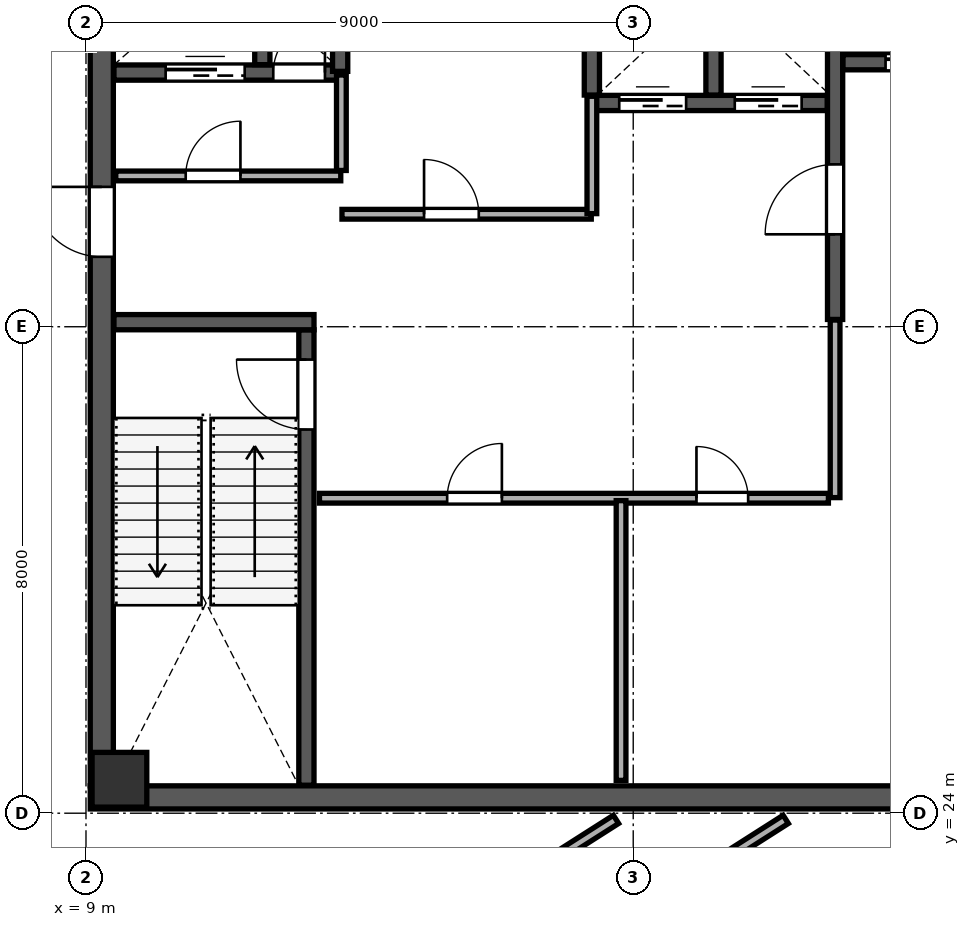
"""IFC4 building model, lengths in metres.
Left out: names, types, materials, properties, quantities, classifications, styles, units other than length and angle.
Written with IfcOpenShell. Run it as: python <this file> out.ifc"""

import sys

from ifc_helpers import new_model, si_unit, direction, frame, frame_2d, origin, origin_2d, place, context, subcontext, project, spatial, rectangle, extrude, source, transform, mapped, element, fill, save


model = new_model("IFC4")
c1 = context("Model", 3, precision=1e-05, world=origin(), true_north=direction((0.0, 1.0)))
c2 = subcontext(c1, "Body", "Model", "MODEL_VIEW")
j1 = project(units=[si_unit("LENGTHUNIT", "METRE"), si_unit("PLANEANGLEUNIT", "RADIAN")], contexts=[c1])
p1 = place(None, origin())
s1 = spatial("IfcSite", under=j1, at=p1, CompositionType="ELEMENT")
p2 = place(p1, origin())
s2 = spatial("IfcBuilding", under=s1, at=p2, CompositionType="ELEMENT")
p3 = place(p2, frame((0.0, 0.0, 315.6)))
s3 = spatial("IfcBuildingStorey", under=s2, at=p3, CompositionType="ELEMENT", Elevation=315.6)
m1 = source(origin(), c2, "Body", "SweptSolid", [
    extrude(rectangle(XDim=0.9, YDim=0.9, at=origin_2d()), origin(), (0.0, 0.0, 1.0), 4.198),
])
p4 = place(p3, frame((9.55, 24.55, 0.001), z_axis=(0.0, 0.0, 1.0), x_axis=(1.0, 0.0, 0.0)))
e1 = element("IfcColumn", 1, at=p4, inside=s3, PredefinedType="COLUMN", context=c2, shape_type="MappedRepresentation", body=[
    mapped(m1, transform((0.0, 0.0, 0.0), scale=1.0)),
])
p5 = place(p3, frame((9.26, 24.45, 0.0), z_axis=(0.0, 0.0, 1.0), x_axis=(0.0, 1.0, 0.0)))
e2 = element("IfcWall", 2, at=p5, inside=s3, PredefinedType="SHEAR", context=c2, shape_type="SweptSolid", body=[
    extrude(rectangle(XDim=15.1, YDim=0.38, at=frame_2d((7.55, 0.0))), origin(), (0.0, 0.0, 1.0), 3.96),
])
p6 = place(p5, frame((8.7, 0.0, 0.0)))
e3 = element("IfcOpeningElement", 3, at=p6, cuts=e2, PredefinedType="OPENING", context=c2, shape_type="SweptSolid", body=[
    extrude(rectangle(XDim=1.15, YDim=2.2, at=frame_2d((0.575, 1.1))), frame((0.0, 0.2, 0.0), z_axis=(0.0, -1.0, 0.0), x_axis=(1.0, 0.0, 0.0)), (0.0, 0.0, 1.0), 0.4),
])
p7 = place(p3, frame((9.07, 24.26, 0.0), z_axis=(0.0, 0.0, 1.0), x_axis=(1.0, 0.0, 0.0)))
e4 = element("IfcWall", 4, at=p7, inside=s3, PredefinedType="SHEAR", context=c2, shape_type="SweptSolid", body=[
    extrude(rectangle(XDim=17.86, YDim=0.38, at=frame_2d((8.93, 0.0))), origin(), (0.0, 0.0, 1.0), 3.96),
])
p8 = place(p3, frame((12.625, 24.46, 0.0), z_axis=(0.0, 0.0, 1.0), x_axis=(0.0, 1.0, 0.0)))
e5 = element("IfcWall", 5, at=p8, inside=s3, PredefinedType="SHEAR", context=c2, shape_type="SweptSolid", body=[
    extrude(rectangle(XDim=7.49, YDim=0.25, at=frame_2d((3.745, 0.0))), origin(), (0.0, 0.0, 1.0), 3.96),
])
p9 = place(p8, frame((5.85, 0.0, 0.0)))
e6 = element("IfcOpeningElement", 6, at=p9, cuts=e5, PredefinedType="OPENING", context=c2, shape_type="SweptSolid", body=[
    extrude(rectangle(XDim=1.15, YDim=2.2, at=frame_2d((0.575, 1.1))), frame((0.0, 0.135, 0.0), z_axis=(0.0, -1.0, 0.0), x_axis=(1.0, 0.0, 0.0)), (0.0, 0.0, 1.0), 0.27),
])
p10 = place(p3, frame((9.46, 32.075, 0.0), z_axis=(0.0, 0.0, 1.0), x_axis=(1.0, 0.0, 0.0)))
e7 = element("IfcWall", 7, at=p10, inside=s3, PredefinedType="SHEAR", context=c2, shape_type="SweptSolid", body=[
    extrude(rectangle(XDim=3.29, YDim=0.25, at=frame_2d((1.645, 0.0))), origin(), (0.0, 0.0, 1.0), 3.96),
])
p11 = place(p3, frame((21.32, 32.12, 0.0), z_axis=(0.0, 0.0, 1.0), x_axis=(0.0, 1.0, 0.0)))
e8 = element("IfcWall", 8, at=p11, inside=s3, PredefinedType="SHEAR", context=c2, shape_type="SweptSolid", body=[
    extrude(rectangle(XDim=7.42, YDim=0.25, at=frame_2d((3.71, 0.0))), origin(), (0.0, 0.0, 1.0), 3.96),
])
p12 = place(p11, frame((1.4, 0.0, 0.0)))
e9 = element("IfcOpeningElement", 9, at=p12, cuts=e8, PredefinedType="OPENING", context=c2, shape_type="SweptSolid", body=[
    extrude(rectangle(XDim=1.15, YDim=2.2, at=frame_2d((0.575, 1.1))), frame((0.0, 0.135, 0.0), z_axis=(0.0, -1.0, 0.0), x_axis=(1.0, 0.0, 0.0)), (0.0, 0.0, 1.0), 0.27),
])
p13 = place(p3, frame((9.46, 36.18, 0.0), z_axis=(0.0, 0.0, 1.0), x_axis=(1.0, 0.0, 0.0)))
e10 = element("IfcWall", 10, at=p13, inside=s3, PredefinedType="SHEAR", context=c2, shape_type="SweptSolid", body=[
    extrude(rectangle(XDim=3.79, YDim=0.25, at=frame_2d((1.895, 0.0))), origin(), (0.0, 0.0, 1.0), 3.96),
])
p14 = place(p13, frame((2.62, 0.0, 0.0)))
e11 = element("IfcOpeningElement", 11, at=p14, cuts=e10, PredefinedType="OPENING", context=c2, shape_type="SweptSolid", body=[
    extrude(rectangle(XDim=0.85, YDim=2.1, at=frame_2d((0.425, 1.05))), frame((0.0, 0.135, 0.0), z_axis=(0.0, -1.0, 0.0), x_axis=(1.0, 0.0, 0.0)), (0.0, 0.0, 1.0), 0.27),
])
p15 = place(p13, frame((0.85, 0.0, 0.0)))
e12 = element("IfcOpeningElement", 12, at=p15, cuts=e10, PredefinedType="OPENING", context=c2, shape_type="SweptSolid", body=[
    extrude(rectangle(XDim=1.3, YDim=2.25, at=frame_2d((0.65, 1.125))), frame((0.0, 0.135, 0.0), z_axis=(0.0, -1.0, 0.0), x_axis=(1.0, 0.0, 0.0)), (0.0, 0.0, 1.0), 0.27),
])
p16 = place(p3, frame((11.9, 36.31, 0.0), z_axis=(0.0, 0.0, 1.0), x_axis=(0.0, 1.0, 0.0)))
e13 = element("IfcWall", 13, at=p16, inside=s3, PredefinedType="SHEAR", context=c2, shape_type="SweptSolid", body=[
    extrude(rectangle(XDim=3.23, YDim=0.25, at=frame_2d((1.615, 0.0))), origin(), (0.0, 0.0, 1.0), 3.96),
])
p17 = place(p3, frame((21.45, 36.35, 0.0), z_axis=(0.0, 0.0, 1.0), x_axis=(1.0, 0.0, 0.0)))
e14 = element("IfcWall", 14, at=p17, inside=s3, PredefinedType="SHEAR", context=c2, shape_type="SweptSolid", body=[
    extrude(rectangle(XDim=5.09, YDim=0.25, at=frame_2d((2.545, 0.0))), origin(), (0.0, 0.0, 1.0), 3.96),
])
p18 = place(p17, frame((0.7, 0.0, 0.0)))
e15 = element("IfcOpeningElement", 15, at=p18, cuts=e14, PredefinedType="OPENING", context=c2, shape_type="SweptSolid", body=[
    extrude(rectangle(XDim=1.2, YDim=2.2, at=frame_2d((0.6, 1.1))), frame((0.0, 0.135, 0.0), z_axis=(0.0, -1.0, 0.0), x_axis=(1.0, 0.0, 0.0)), (0.0, 0.0, 1.0), 0.27),
])
p19 = place(p17, frame((3.25, 0.0, 0.0)))
e16 = element("IfcOpeningElement", 16, at=p19, cuts=e14, PredefinedType="OPENING", context=c2, shape_type="SweptSolid", body=[
    extrude(rectangle(XDim=1.2, YDim=2.2, at=frame_2d((0.6, 1.1))), frame((0.0, 0.135, 0.0), z_axis=(0.0, -1.0, 0.0), x_axis=(1.0, 0.0, 0.0)), (0.0, 0.0, 1.0), 0.27),
])
p20 = place(p3, frame((13.18, 36.2, 0.0), z_axis=(0.0, 0.0, 1.0), x_axis=(0.0, 1.0, 0.0)))
e17 = element("IfcWall", 17, at=p20, inside=s3, PredefinedType="SHEAR", context=c2, shape_type="SweptSolid", body=[
    extrude(rectangle(XDim=3.34, YDim=0.25, at=frame_2d((1.67, 0.0))), origin(), (0.0, 0.0, 1.0), 3.96),
])
p21 = place(p3, frame((17.32, 35.68, 0.0), z_axis=(0.0, 0.0, 1.0), x_axis=(1.0, 0.0, 0.0)))
e18 = element("IfcWall", 18, at=p21, inside=s3, PredefinedType="SHEAR", context=c2, shape_type="SweptSolid", body=[
    extrude(rectangle(XDim=3.87, YDim=0.25, at=frame_2d((1.935, 0.0))), origin(), (0.0, 0.0, 1.0), 3.96),
])
p22 = place(p21, frame((0.45, 0.0, 0.0)))
e19 = element("IfcOpeningElement", 19, at=p22, cuts=e18, PredefinedType="OPENING", context=c2, shape_type="SweptSolid", body=[
    extrude(rectangle(XDim=1.1, YDim=2.2, at=frame_2d((0.55, 1.1))), frame((0.0, 0.135, 0.0), z_axis=(0.0, -1.0, 0.0), x_axis=(1.0, 0.0, 0.0)), (0.0, 0.0, 1.0), 0.27),
])
p23 = place(p21, frame((2.35, 0.0, 0.0)))
e20 = element("IfcOpeningElement", 20, at=p23, cuts=e18, PredefinedType="OPENING", context=c2, shape_type="SweptSolid", body=[
    extrude(rectangle(XDim=1.1, YDim=2.2, at=frame_2d((0.55, 1.1))), frame((0.0, 0.135, 0.0), z_axis=(0.0, -1.0, 0.0), x_axis=(1.0, 0.0, 0.0)), (0.0, 0.0, 1.0), 0.27),
])
for number, where, z_axis, x_axis in (
    (21, (17.32, 35.81, 0.0), (0.0, 0.0, 1.0), (0.0, 1.0, 0.0)),
    (22, (19.32, 35.81, 0.0), (0.0, 0.0, 1.0), (0.0, 1.0, 0.0)),
):
    element("IfcWall", number, at=place(p3, frame(where, z_axis=z_axis, x_axis=x_axis)), inside=s3, PredefinedType="SHEAR", context=c2, shape_type="SweptSolid", body=[
        extrude(rectangle(XDim=3.73, YDim=0.25, at=frame_2d((1.865, 0.0))), origin(), (0.0, 0.0, 1.0), 3.96),
    ])
p24 = place(p3, frame((9.49, 34.48, 0.0), z_axis=(0.0, 0.0, 1.0), x_axis=(1.0, 0.0, 0.0)))
e23 = element("IfcWall", 23, at=p24, inside=s3, PredefinedType="PARTITIONING", context=c2, shape_type="SweptSolid", body=[
    extrude(rectangle(XDim=3.7, YDim=0.16, at=frame_2d((1.85, 0.0))), origin(), (0.0, 0.0, 1.0), 3.96),
])
p25 = place(p24, frame((1.15, 0.0, 0.0)))
e24 = element("IfcOpeningElement", 24, at=p25, cuts=e23, PredefinedType="OPENING", context=c2, shape_type="SweptSolid", body=[
    extrude(rectangle(XDim=0.9, YDim=2.15, at=frame_2d((0.45, 1.075))), frame((0.0, 0.09, 0.0), z_axis=(0.0, -1.0, 0.0), x_axis=(1.0, 0.0, 0.0)), (0.0, 0.0, 1.0), 0.18),
])
p26 = place(p3, frame((13.2, 34.57, 0.0), z_axis=(0.0, 0.0, 1.0), x_axis=(0.0, 1.0, 0.0)))
e25 = element("IfcWall", 25, at=p26, inside=s3, PredefinedType="PARTITIONING", context=c2, shape_type="SweptSolid", body=[
    extrude(rectangle(XDim=1.57, YDim=0.16, at=frame_2d((0.785, 0.0))), origin(), (0.0, 0.0, 1.0), 3.96),
])
p27 = place(p3, frame((13.21, 33.85, 0.0), z_axis=(0.0, 0.0, 1.0), x_axis=(1.0, 0.0, 0.0)))
e26 = element("IfcWall", 26, at=p27, inside=s3, PredefinedType="PARTITIONING", context=c2, shape_type="SweptSolid", body=[
    extrude(rectangle(XDim=4.1, YDim=0.16, at=frame_2d((2.05, 0.0))), origin(), (0.0, 0.0, 1.0), 3.96),
])
p28 = place(p27, frame((1.35, 0.0, 0.0)))
e27 = element("IfcOpeningElement", 27, at=p28, cuts=e26, PredefinedType="OPENING", context=c2, shape_type="SweptSolid", body=[
    extrude(rectangle(XDim=0.9, YDim=2.15, at=frame_2d((0.45, 1.075))), frame((0.0, 0.09, 0.0), z_axis=(0.0, -1.0, 0.0), x_axis=(1.0, 0.0, 0.0)), (0.0, 0.0, 1.0), 0.18),
])
p29 = place(p3, frame((17.32, 33.86, 0.0), z_axis=(0.0, 0.0, 1.0), x_axis=(0.0, 1.0, 0.0)))
e28 = element("IfcWall", 28, at=p29, inside=s3, PredefinedType="PARTITIONING", context=c2, shape_type="SweptSolid", body=[
    extrude(rectangle(XDim=1.93, YDim=0.16, at=frame_2d((0.965, 0.0))), origin(), (0.0, 0.0, 1.0), 3.96),
])
p30 = place(p3, frame((12.84, 29.18, 0.0), z_axis=(0.0, 0.0, 1.0), x_axis=(1.0, 0.0, 0.0)))
e29 = element("IfcWall", 29, at=p30, inside=s3, PredefinedType="PARTITIONING", context=c2, shape_type="SweptSolid", body=[
    extrude(rectangle(XDim=8.37, YDim=0.16, at=frame_2d((4.185, 0.0))), origin(), (0.0, 0.0, 1.0), 3.96),
])
p31 = place(p30, frame((2.1, 0.0, 0.0)))
e30 = element("IfcOpeningElement", 30, at=p31, cuts=e29, PredefinedType="OPENING", context=c2, shape_type="SweptSolid", body=[
    extrude(rectangle(XDim=0.9, YDim=2.15, at=frame_2d((0.45, 1.075))), frame((0.0, 0.09, 0.0), z_axis=(0.0, -1.0, 0.0), x_axis=(1.0, 0.0, 0.0)), (0.0, 0.0, 1.0), 0.18),
])
p32 = place(p30, frame((6.2, 0.0, 0.0)))
e31 = element("IfcOpeningElement", 31, at=p32, cuts=e29, PredefinedType="OPENING", context=c2, shape_type="SweptSolid", body=[
    extrude(rectangle(XDim=0.85, YDim=2.1, at=frame_2d((0.425, 1.05))), frame((0.0, 0.09, 0.0), z_axis=(0.0, -1.0, 0.0), x_axis=(1.0, 0.0, 0.0)), (0.0, 0.0, 1.0), 0.18),
])
p33 = place(p3, frame((17.8, 24.54, 0.0), z_axis=(0.0, 0.0, 1.0), x_axis=(0.0, 1.0, 0.0)))
e32 = element("IfcWall", 32, at=p33, inside=s3, PredefinedType="PARTITIONING", context=c2, shape_type="SweptSolid", body=[
    extrude(rectangle(XDim=4.6, YDim=0.16, at=frame_2d((2.3, 0.0))), origin(), (0.0, 0.0, 1.0), 3.96),
])
p34 = place(p3, frame((21.32, 29.19, 0.0), z_axis=(0.0, 0.0, 1.0), x_axis=(0.0, 1.0, 0.0)))
e33 = element("IfcWall", 33, at=p34, inside=s3, PredefinedType="PARTITIONING", context=c2, shape_type="SweptSolid", body=[
    extrude(rectangle(XDim=2.92, YDim=0.16, at=frame_2d((1.46, 0.0))), origin(), (0.0, 0.0, 1.0), 3.96),
])
p35 = place(p3, frame((3.26, 30.945, 0.0), z_axis=(0.0, 0.0, 1.0), x_axis=(0.537307625317, -0.843386338386, 0.0)))
e34 = element("IfcWall", 34, at=p35, inside=s3, PredefinedType="PARTITIONING", context=c2, shape_type="SweptSolid", body=[
    extrude(rectangle(XDim=13.67, YDim=0.16, at=frame_2d((6.835, 0.0))), origin(), (0.0, 0.0, 1.0), 3.96),
])
p36 = place(p35, frame((1.15, 0.0, 0.0)))
e35 = element("IfcOpeningElement", 35, at=p36, cuts=e34, PredefinedType="OPENING", context=c2, shape_type="SweptSolid", body=[
    extrude(rectangle(XDim=0.95, YDim=2.15, at=frame_2d((0.475, 1.075))), frame((0.0, 0.09, 0.0), z_axis=(0.0, -1.0, 0.0), x_axis=(1.0, 0.0, 0.0)), (0.0, 0.0, 1.0), 0.18),
])
p37 = place(p3, frame((10.661, 19.403, 0.0), z_axis=(0.0, 0.0, 1.0), x_axis=(0.843399441764, 0.537287057012, 0.0)))
e36 = element("IfcWall", 36, at=p37, inside=s3, PredefinedType="PARTITIONING", context=c2, shape_type="SweptSolid", body=[
    extrude(rectangle(XDim=8.366, YDim=0.16, at=frame_2d((4.183, 0.0))), origin(), (0.0, 0.0, 1.0), 3.96),
])
p38 = place(p3, frame((1.798, 36.107, 0.0), z_axis=(0.0, 0.0, 1.0), x_axis=(0.843396745572, 0.537291289301, 0.0)))
e37 = element("IfcWall", 37, at=p38, inside=s3, PredefinedType="PARTITIONING", context=c2, shape_type="SweptSolid", body=[
    extrude(rectangle(XDim=17.17, YDim=0.135, at=frame_2d((8.585, 0.0))), origin(), (0.0, 0.0, 1.0), 3.96),
])
p39 = place(p3, frame((9.687, 17.004, 0.0), z_axis=(0.0, 0.0, 1.0), x_axis=(0.843392646996, 0.537297722862, 0.0)))
e38 = element("IfcWall", 38, at=p39, inside=s3, PredefinedType="PARTITIONING", context=c2, shape_type="SweptSolid", body=[
    extrude(rectangle(XDim=12.831, YDim=0.16, at=frame_2d((6.416, 0.0))), origin(), (0.0, 0.0, 1.0), 3.96),
])
m2 = source(origin(), c2, "Body", "SweptSolid", [
    extrude(rectangle(XDim=1.15, YDim=2.2, at=frame_2d((0.575, 1.1))), frame((0.0, 0.025, 0.0), z_axis=(0.0, -1.0, 0.0), x_axis=(1.0, 0.0, 0.0)), (0.0, 0.0, 1.0), 0.05),
])
p40 = place(p9, origin())
e39 = element("IfcDoor", 39, at=p40, inside=s3, OperationType="SINGLE_SWING_RIGHT", PredefinedType="DOOR", context=c2, shape_type="MappedRepresentation", body=[
    mapped(m2, transform((0.0, 0.0, 0.0), scale=1.0)),
])
fill(e6, e39)
m3 = source(origin(), c2, "Body", "SweptSolid", [
    extrude(rectangle(XDim=1.15, YDim=2.2, at=frame_2d((0.575, 1.1))), frame((0.0, 0.025, 0.0), z_axis=(0.0, -1.0, 0.0), x_axis=(1.0, 0.0, 0.0)), (0.0, 0.0, 1.0), 0.05),
])
p41 = place(p12, origin())
e40 = element("IfcDoor", 40, at=p41, inside=s3, OperationType="SINGLE_SWING_LEFT", PredefinedType="DOOR", context=c2, shape_type="MappedRepresentation", body=[
    mapped(m3, transform((0.0, 0.0, 0.0), scale=1.0)),
])
fill(e9, e40)
p42 = place(p6, origin())
e41 = element("IfcDoor", 41, at=p42, inside=s3, OperationType="SINGLE_SWING_RIGHT", PredefinedType="DOOR", context=c2, shape_type="MappedRepresentation", body=[
    mapped(m3, transform((0.0, 0.0, 0.0), scale=1.0)),
])
fill(e3, e41)
m4 = source(origin(), c2, "Body", "SweptSolid", [
    extrude(rectangle(XDim=0.85, YDim=2.1, at=frame_2d((0.425, 1.05))), frame((0.0, 0.025, 0.0), z_axis=(0.0, -1.0, 0.0), x_axis=(1.0, 0.0, 0.0)), (0.0, 0.0, 1.0), 0.05),
])
p43 = place(p14, origin())
e42 = element("IfcDoor", 42, at=p43, inside=s3, OperationType="SINGLE_SWING_RIGHT", PredefinedType="DOOR", context=c2, shape_type="MappedRepresentation", body=[
    mapped(m4, transform((0.0, 0.0, 0.0), scale=1.0)),
])
fill(e11, e42)
m5 = source(origin(), c2, "Body", "SweptSolid", [
    extrude(rectangle(XDim=1.1, YDim=2.2, at=frame_2d((0.55, 1.1))), frame((0.0, 0.025, 0.0), z_axis=(0.0, -1.0, 0.0), x_axis=(1.0, 0.0, 0.0)), (0.0, 0.0, 1.0), 0.05),
])
p44 = place(p22, origin())
e43 = element("IfcDoor", 43, at=p44, inside=s3, OperationType="SLIDING_TO_LEFT", PredefinedType="DOOR", context=c2, shape_type="MappedRepresentation", body=[
    mapped(m5, transform((0.0, 0.0, 0.0), scale=1.0)),
])
fill(e19, e43)
p45 = place(p23, origin())
e44 = element("IfcDoor", 44, at=p45, inside=s3, OperationType="SLIDING_TO_RIGHT", PredefinedType="DOOR", context=c2, shape_type="MappedRepresentation", body=[
    mapped(m5, transform((0.0, 0.0, 0.0), scale=1.0)),
])
fill(e20, e44)
m6 = source(origin(), c2, "Body", "SweptSolid", [
    extrude(rectangle(XDim=1.2, YDim=2.2, at=frame_2d((0.6, 1.1))), frame((0.0, 0.025, 0.0), z_axis=(0.0, -1.0, 0.0), x_axis=(1.0, 0.0, 0.0)), (0.0, 0.0, 1.0), 0.05),
])
p46 = place(p18, origin())
e45 = element("IfcDoor", 45, at=p46, inside=s3, OperationType="SLIDING_TO_LEFT", PredefinedType="DOOR", context=c2, shape_type="MappedRepresentation", body=[
    mapped(m6, transform((0.0, 0.0, 0.0), scale=1.0)),
])
fill(e15, e45)
m7 = source(origin(), c2, "Body", "SweptSolid", [
    extrude(rectangle(XDim=1.3, YDim=2.25, at=frame_2d((0.65, 1.125))), frame((0.0, 0.025, 0.0), z_axis=(0.0, -1.0, 0.0), x_axis=(1.0, 0.0, 0.0)), (0.0, 0.0, 1.0), 0.05),
])
p47 = place(p15, origin())
e46 = element("IfcDoor", 46, at=p47, inside=s3, OperationType="SLIDING_TO_LEFT", PredefinedType="DOOR", context=c2, shape_type="MappedRepresentation", body=[
    mapped(m7, transform((0.0, 0.0, 0.0), scale=1.0)),
])
fill(e12, e46)
m8 = source(origin(), c2, "Body", "SweptSolid", [
    extrude(rectangle(XDim=0.9, YDim=2.15, at=frame_2d((0.45, 1.075))), frame((0.0, 0.025, 0.0), z_axis=(0.0, -1.0, 0.0), x_axis=(1.0, 0.0, 0.0)), (0.0, 0.0, 1.0), 0.05),
])
p48 = place(p25, origin())
e47 = element("IfcDoor", 47, at=p48, inside=s3, OperationType="SINGLE_SWING_RIGHT", PredefinedType="DOOR", context=c2, shape_type="MappedRepresentation", body=[
    mapped(m8, transform((0.0, 0.0, 0.0), scale=1.0)),
])
fill(e24, e47)
p49 = place(p28, origin())
e48 = element("IfcDoor", 48, at=p49, inside=s3, OperationType="SINGLE_SWING_LEFT", PredefinedType="DOOR", context=c2, shape_type="MappedRepresentation", body=[
    mapped(m8, transform((0.0, 0.0, 0.0), scale=1.0)),
])
fill(e27, e48)
p50 = place(p31, origin())
e49 = element("IfcDoor", 49, at=p50, inside=s3, OperationType="SINGLE_SWING_RIGHT", PredefinedType="DOOR", context=c2, shape_type="MappedRepresentation", body=[
    mapped(m8, transform((0.0, 0.0, 0.0), scale=1.0)),
])
fill(e30, e49)
p51 = place(p32, origin())
e50 = element("IfcDoor", 50, at=p51, inside=s3, OperationType="SINGLE_SWING_LEFT", PredefinedType="DOOR", context=c2, shape_type="MappedRepresentation", body=[
    mapped(m4, transform((0.0, 0.0, 0.0), scale=1.0)),
])
fill(e31, e50)
save(model, sys.argv[1])
